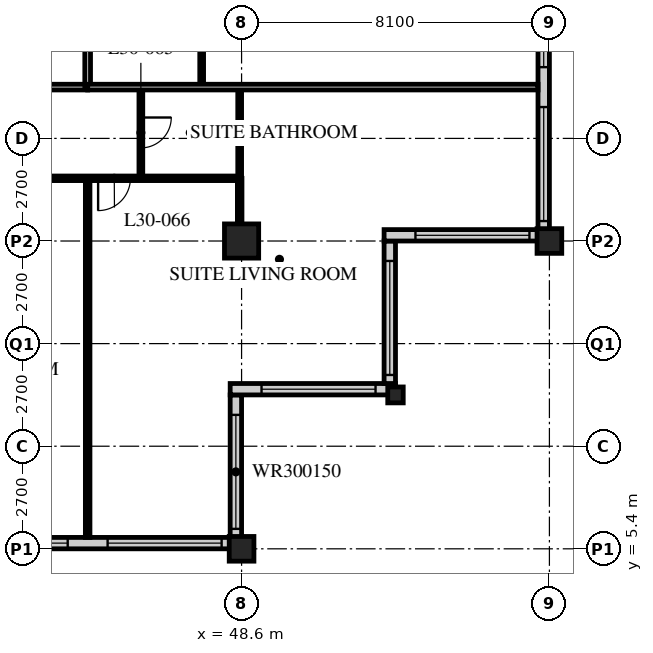
"""IFC4 building model, lengths in metres.
Left out: names, types, materials, properties, quantities, classifications, styles, units other than length and angle.
Written with IfcOpenShell. Run it as: python <this file> out.ifc"""

import sys

from ifc_helpers import new_model, si_unit, direction, frame, frame_2d, origin, origin_2d, place, context, subcontext, project, spatial, rectangle, hollow_rectangle, i_section, extrude, element, fill, save


model = new_model("IFC4")
c1 = context("Model", 3, precision=1e-05, world=origin(), true_north=direction((0.0, 1.0)))
c2 = subcontext(c1, "Body", "Model", "MODEL_VIEW")
j1 = project(units=[si_unit("LENGTHUNIT", "METRE"), si_unit("PLANEANGLEUNIT", "RADIAN")], contexts=[c1])
p1 = place(None, origin())
s1 = spatial("IfcSite", under=j1, at=p1, CompositionType="ELEMENT")
p2 = place(p1, origin())
s2 = spatial("IfcBuilding", under=s1, at=p2, CompositionType="ELEMENT")
p3 = place(p2, frame((0.0, 0.0, 120.4)))
s3 = spatial("IfcBuildingStorey", under=s2, at=p3, CompositionType="ELEMENT", Elevation=120.4)
p4 = place(p3, frame((48.6, 5.4, 0.0), z_axis=(0.0, 0.0, 1.0), x_axis=(1.0, 0.0, 0.0)))
e1 = element("IfcColumn", 1, at=p4, inside=s3, PredefinedType="COLUMN", context=c2, shape_type="SweptSolid", body=[
    extrude(hollow_rectangle(XDim=0.65, YDim=0.65, WallThickness=0.055, at=origin_2d()), origin(), (0.0, 0.0, 1.0), 3.4),
])
p5 = place(p3, frame((48.6, 13.5, 0.0), z_axis=(0.0, 0.0, 1.0), x_axis=(1.0, 0.0, 0.0)))
e2 = element("IfcColumn", 2, at=p5, inside=s3, PredefinedType="COLUMN", context=c2, shape_type="SweptSolid", body=[
    extrude(hollow_rectangle(XDim=0.9, YDim=0.9, WallThickness=0.09, at=origin_2d()), origin(), (0.0, 0.0, 1.0), 3.4),
])
p6 = place(p3, frame((52.65, 9.45, 0.0), z_axis=(0.0, 0.0, 1.0), x_axis=(1.0, 0.0, 0.0)))
e3 = element("IfcColumn", 3, at=p6, inside=s3, PredefinedType="COLUMN", context=c2, shape_type="SweptSolid", body=[
    extrude(i_section(OverallWidth=0.407, OverallDepth=0.419, WebThickness=0.031, FlangeThickness=0.049, FilletRadius=0.015, at=origin_2d()), origin(), (0.0, 0.0, 1.0), 3.4),
])
p7 = place(p3, frame((56.7, 13.5, 0.0), z_axis=(0.0, 0.0, 1.0), x_axis=(1.0, 0.0, 0.0)))
e4 = element("IfcColumn", 4, at=p7, inside=s3, PredefinedType="COLUMN", context=c2, shape_type="SweptSolid", body=[
    extrude(hollow_rectangle(XDim=0.65, YDim=0.65, WallThickness=0.055, at=origin_2d()), origin(), (0.0, 0.0, 1.0), 3.4),
])
p8 = place(p3, frame((8.4, 5.55, 0.0), z_axis=(0.0, 0.0, 1.0), x_axis=(1.0, 0.0, 0.0)))
e5 = element("IfcWall", 5, at=p8, inside=s3, PredefinedType="SOLIDWALL", context=c2, shape_type="SweptSolid", body=[
    extrude(rectangle(XDim=40.2, YDim=0.3, at=frame_2d((20.1, 0.0))), origin(), (0.0, 0.0, 1.0), 3.19),
])
p9 = place(p8, frame((0.225, 0.0, 0.9)))
e6 = element("IfcOpeningElement", 6, at=p9, cuts=e5, PredefinedType="OPENING", context=c2, shape_type="SweptSolid", body=[
    extrude(rectangle(XDim=3.0, YDim=2.0, at=frame_2d((1.5, 1.0))), frame((0.0, 0.16, 0.0), z_axis=(0.0, -1.0, 0.0), x_axis=(1.0, 0.0, 0.0)), (0.0, 0.0, 1.0), 0.32),
])
p10 = place(p8, frame((4.275, 0.0, 0.9)))
e7 = element("IfcOpeningElement", 7, at=p10, cuts=e5, PredefinedType="OPENING", context=c2, shape_type="SweptSolid", body=[
    extrude(rectangle(XDim=3.0, YDim=2.0, at=frame_2d((1.5, 1.0))), frame((0.0, 0.16, 0.0), z_axis=(0.0, -1.0, 0.0), x_axis=(1.0, 0.0, 0.0)), (0.0, 0.0, 1.0), 0.32),
])
p11 = place(p8, frame((8.325, 0.0, 0.9)))
e8 = element("IfcOpeningElement", 8, at=p11, cuts=e5, PredefinedType="OPENING", context=c2, shape_type="SweptSolid", body=[
    extrude(rectangle(XDim=3.0, YDim=2.0, at=frame_2d((1.5, 1.0))), frame((0.0, 0.16, 0.0), z_axis=(0.0, -1.0, 0.0), x_axis=(1.0, 0.0, 0.0)), (0.0, 0.0, 1.0), 0.32),
])
p12 = place(p8, frame((12.375, 0.0, 0.9)))
e9 = element("IfcOpeningElement", 9, at=p12, cuts=e5, PredefinedType="OPENING", context=c2, shape_type="SweptSolid", body=[
    extrude(rectangle(XDim=3.0, YDim=2.0, at=frame_2d((1.5, 1.0))), frame((0.0, 0.16, 0.0), z_axis=(0.0, -1.0, 0.0), x_axis=(1.0, 0.0, 0.0)), (0.0, 0.0, 1.0), 0.32),
])
p13 = place(p8, frame((16.425, 0.0, 0.9)))
e10 = element("IfcOpeningElement", 10, at=p13, cuts=e5, PredefinedType="OPENING", context=c2, shape_type="SweptSolid", body=[
    extrude(rectangle(XDim=3.0, YDim=2.0, at=frame_2d((1.5, 1.0))), frame((0.0, 0.16, 0.0), z_axis=(0.0, -1.0, 0.0), x_axis=(1.0, 0.0, 0.0)), (0.0, 0.0, 1.0), 0.32),
])
p14 = place(p8, frame((20.475, 0.0, 0.9)))
e11 = element("IfcOpeningElement", 11, at=p14, cuts=e5, PredefinedType="OPENING", context=c2, shape_type="SweptSolid", body=[
    extrude(rectangle(XDim=3.0, YDim=2.0, at=frame_2d((1.5, 1.0))), frame((0.0, 0.16, 0.0), z_axis=(0.0, -1.0, 0.0), x_axis=(1.0, 0.0, 0.0)), (0.0, 0.0, 1.0), 0.32),
])
p15 = place(p8, frame((24.525, 0.0, 0.9)))
e12 = element("IfcOpeningElement", 12, at=p15, cuts=e5, PredefinedType="OPENING", context=c2, shape_type="SweptSolid", body=[
    extrude(rectangle(XDim=3.0, YDim=2.0, at=frame_2d((1.5, 1.0))), frame((0.0, 0.16, 0.0), z_axis=(0.0, -1.0, 0.0), x_axis=(1.0, 0.0, 0.0)), (0.0, 0.0, 1.0), 0.32),
])
p16 = place(p8, frame((28.575, 0.0, 0.9)))
e13 = element("IfcOpeningElement", 13, at=p16, cuts=e5, PredefinedType="OPENING", context=c2, shape_type="SweptSolid", body=[
    extrude(rectangle(XDim=3.0, YDim=2.0, at=frame_2d((1.5, 1.0))), frame((0.0, 0.16, 0.0), z_axis=(0.0, -1.0, 0.0), x_axis=(1.0, 0.0, 0.0)), (0.0, 0.0, 1.0), 0.32),
])
p17 = place(p8, frame((32.625, 0.0, 0.9)))
e14 = element("IfcOpeningElement", 14, at=p17, cuts=e5, PredefinedType="OPENING", context=c2, shape_type="SweptSolid", body=[
    extrude(rectangle(XDim=3.0, YDim=2.0, at=frame_2d((1.5, 1.0))), frame((0.0, 0.16, 0.0), z_axis=(0.0, -1.0, 0.0), x_axis=(1.0, 0.0, 0.0)), (0.0, 0.0, 1.0), 0.32),
])
p18 = place(p8, frame((36.675, 0.0, 0.9)))
e15 = element("IfcOpeningElement", 15, at=p18, cuts=e5, PredefinedType="OPENING", context=c2, shape_type="SweptSolid", body=[
    extrude(rectangle(XDim=3.0, YDim=2.0, at=frame_2d((1.5, 1.0))), frame((0.0, 0.16, 0.0), z_axis=(0.0, -1.0, 0.0), x_axis=(1.0, 0.0, 0.0)), (0.0, 0.0, 1.0), 0.32),
])
p19 = place(p3, frame((48.45, 5.7, 0.0), z_axis=(0.0, 0.0, 1.0), x_axis=(0.0, 1.0, 0.0)))
e16 = element("IfcWall", 16, at=p19, inside=s3, PredefinedType="SOLIDWALL", context=c2, shape_type="SweptSolid", body=[
    extrude(rectangle(XDim=3.75, YDim=0.3, at=frame_2d((1.875, 0.0))), origin(), (0.0, 0.0, 1.0), 3.19),
])
p20 = place(p19, frame((0.225, 0.0, 0.9)))
e17 = element("IfcOpeningElement", 17, at=p20, cuts=e16, PredefinedType="OPENING", context=c2, shape_type="SweptSolid", body=[
    extrude(rectangle(XDim=3.0, YDim=1.5, at=frame_2d((1.5, 0.75))), frame((0.0, 0.16, 0.0), z_axis=(0.0, -1.0, 0.0), x_axis=(1.0, 0.0, 0.0)), (0.0, 0.0, 1.0), 0.32),
])
p21 = place(p3, frame((48.3, 9.6, 0.0), z_axis=(0.0, 0.0, 1.0), x_axis=(1.0, 0.0, 0.0)))
e18 = element("IfcWall", 18, at=p21, inside=s3, PredefinedType="SOLIDWALL", context=c2, shape_type="SweptSolid", body=[
    extrude(rectangle(XDim=4.35, YDim=0.3, at=frame_2d((2.175, 0.0))), origin(), (0.0, 0.0, 1.0), 3.19),
])
p22 = place(p21, frame((0.825, 0.0, 0.9)))
e19 = element("IfcOpeningElement", 19, at=p22, cuts=e18, PredefinedType="OPENING", context=c2, shape_type="SweptSolid", body=[
    extrude(rectangle(XDim=3.0, YDim=1.5, at=frame_2d((1.5, 0.75))), frame((0.0, 0.16, 0.0), z_axis=(0.0, -1.0, 0.0), x_axis=(1.0, 0.0, 0.0)), (0.0, 0.0, 1.0), 0.32),
])
p23 = place(p3, frame((52.5, 9.75, 0.0), z_axis=(0.0, 0.0, 1.0), x_axis=(0.0, 1.0, 0.0)))
e20 = element("IfcWall", 20, at=p23, inside=s3, PredefinedType="SOLIDWALL", context=c2, shape_type="SweptSolid", body=[
    extrude(rectangle(XDim=3.75, YDim=0.3, at=frame_2d((1.875, 0.0))), origin(), (0.0, 0.0, 1.0), 3.19),
])
p24 = place(p23, frame((0.225, 0.0, 0.9)))
e21 = element("IfcOpeningElement", 21, at=p24, cuts=e20, PredefinedType="OPENING", context=c2, shape_type="SweptSolid", body=[
    extrude(rectangle(XDim=3.0, YDim=1.5, at=frame_2d((1.5, 0.75))), frame((0.0, 0.16, 0.0), z_axis=(0.0, -1.0, 0.0), x_axis=(1.0, 0.0, 0.0)), (0.0, 0.0, 1.0), 0.32),
])
p25 = place(p3, frame((52.35, 13.65, 0.0), z_axis=(0.0, 0.0, 1.0), x_axis=(1.0, 0.0, 0.0)))
e22 = element("IfcWall", 22, at=p25, inside=s3, PredefinedType="SOLIDWALL", context=c2, shape_type="SweptSolid", body=[
    extrude(rectangle(XDim=4.35, YDim=0.3, at=frame_2d((2.175, 0.0))), origin(), (0.0, 0.0, 1.0), 3.19),
])
p26 = place(p25, frame((0.825, 0.0, 0.9)))
e23 = element("IfcOpeningElement", 23, at=p26, cuts=e22, PredefinedType="OPENING", context=c2, shape_type="SweptSolid", body=[
    extrude(rectangle(XDim=3.0, YDim=1.5, at=frame_2d((1.5, 0.75))), frame((0.0, 0.16, 0.0), z_axis=(0.0, -1.0, 0.0), x_axis=(1.0, 0.0, 0.0)), (0.0, 0.0, 1.0), 0.32),
])
p27 = place(p3, frame((56.55, 13.8, 0.0), z_axis=(0.0, 0.0, 1.0), x_axis=(0.0, 1.0, 0.0)))
e24 = element("IfcWall", 24, at=p27, inside=s3, PredefinedType="SOLIDWALL", context=c2, shape_type="SweptSolid", body=[
    extrude(rectangle(XDim=32.1, YDim=0.3, at=frame_2d((16.05, 0.0))), origin(), (0.0, 0.0, 1.0), 3.19),
])
p28 = place(p27, frame((0.225, 0.0, 0.9)))
e25 = element("IfcOpeningElement", 25, at=p28, cuts=e24, PredefinedType="OPENING", context=c2, shape_type="SweptSolid", body=[
    extrude(rectangle(XDim=3.0, YDim=2.0, at=frame_2d((1.5, 1.0))), frame((0.0, 0.16, 0.0), z_axis=(0.0, -1.0, 0.0), x_axis=(1.0, 0.0, 0.0)), (0.0, 0.0, 1.0), 0.32),
])
p29 = place(p27, frame((4.275, 0.0, 0.9)))
e26 = element("IfcOpeningElement", 26, at=p29, cuts=e24, PredefinedType="OPENING", context=c2, shape_type="SweptSolid", body=[
    extrude(rectangle(XDim=3.0, YDim=2.0, at=frame_2d((1.5, 1.0))), frame((0.0, 0.16, 0.0), z_axis=(0.0, -1.0, 0.0), x_axis=(1.0, 0.0, 0.0)), (0.0, 0.0, 1.0), 0.32),
])
p30 = place(p27, frame((8.325, 0.0, 0.9)))
e27 = element("IfcOpeningElement", 27, at=p30, cuts=e24, PredefinedType="OPENING", context=c2, shape_type="SweptSolid", body=[
    extrude(rectangle(XDim=3.0, YDim=2.0, at=frame_2d((1.5, 1.0))), frame((0.0, 0.16, 0.0), z_axis=(0.0, -1.0, 0.0), x_axis=(1.0, 0.0, 0.0)), (0.0, 0.0, 1.0), 0.32),
])
p31 = place(p27, frame((12.375, 0.0, 0.9)))
e28 = element("IfcOpeningElement", 28, at=p31, cuts=e24, PredefinedType="OPENING", context=c2, shape_type="SweptSolid", body=[
    extrude(rectangle(XDim=3.0, YDim=2.0, at=frame_2d((1.5, 1.0))), frame((0.0, 0.16, 0.0), z_axis=(0.0, -1.0, 0.0), x_axis=(1.0, 0.0, 0.0)), (0.0, 0.0, 1.0), 0.32),
])
p32 = place(p27, frame((16.425, 0.0, 0.9)))
e29 = element("IfcOpeningElement", 29, at=p32, cuts=e24, PredefinedType="OPENING", context=c2, shape_type="SweptSolid", body=[
    extrude(rectangle(XDim=3.0, YDim=2.0, at=frame_2d((1.5, 1.0))), frame((0.0, 0.16, 0.0), z_axis=(0.0, -1.0, 0.0), x_axis=(1.0, 0.0, 0.0)), (0.0, 0.0, 1.0), 0.32),
])
p33 = place(p27, frame((20.475, 0.0, 0.9)))
e30 = element("IfcOpeningElement", 30, at=p33, cuts=e24, PredefinedType="OPENING", context=c2, shape_type="SweptSolid", body=[
    extrude(rectangle(XDim=3.0, YDim=2.0, at=frame_2d((1.5, 1.0))), frame((0.0, 0.16, 0.0), z_axis=(0.0, -1.0, 0.0), x_axis=(1.0, 0.0, 0.0)), (0.0, 0.0, 1.0), 0.32),
])
p34 = place(p27, frame((24.525, 0.0, 0.9)))
e31 = element("IfcOpeningElement", 31, at=p34, cuts=e24, PredefinedType="OPENING", context=c2, shape_type="SweptSolid", body=[
    extrude(rectangle(XDim=3.0, YDim=2.0, at=frame_2d((1.5, 1.0))), frame((0.0, 0.16, 0.0), z_axis=(0.0, -1.0, 0.0), x_axis=(1.0, 0.0, 0.0)), (0.0, 0.0, 1.0), 0.32),
])
p35 = place(p27, frame((28.575, 0.0, 0.9)))
e32 = element("IfcOpeningElement", 32, at=p35, cuts=e24, PredefinedType="OPENING", context=c2, shape_type="SweptSolid", body=[
    extrude(rectangle(XDim=3.0, YDim=2.0, at=frame_2d((1.5, 1.0))), frame((0.0, 0.16, 0.0), z_axis=(0.0, -1.0, 0.0), x_axis=(1.0, 0.0, 0.0)), (0.0, 0.0, 1.0), 0.32),
])
p36 = place(p3, frame((12.15, 17.55, 0.0), z_axis=(0.0, 0.0, 1.0), x_axis=(1.0, 0.0, 0.0)))
e33 = element("IfcWall", 33, at=p36, inside=s3, PredefinedType="PARTITIONING", context=c2, shape_type="SweptSolid", body=[
    extrude(rectangle(XDim=32.4, YDim=0.15, at=frame_2d((16.2, 0.0))), origin(), (0.0, 0.0, 1.0), 3.19),
])
p37 = place(p36, frame((5.95, 0.0, 0.0)))
e34 = element("IfcOpeningElement", 34, at=p37, cuts=e33, PredefinedType="OPENING", context=c2, shape_type="SweptSolid", body=[
    extrude(rectangle(XDim=1.0, YDim=2.1, at=frame_2d((0.5, 1.05))), frame((0.0, 0.085, 0.0), z_axis=(0.0, -1.0, 0.0), x_axis=(1.0, 0.0, 0.0)), (0.0, 0.0, 1.0), 0.17),
])
p38 = place(p36, frame((17.725, 0.0, 0.0)))
e35 = element("IfcOpeningElement", 35, at=p38, cuts=e33, PredefinedType="OPENING", context=c2, shape_type="SweptSolid", body=[
    extrude(rectangle(XDim=1.0, YDim=2.1, at=frame_2d((0.5, 1.05))), frame((0.0, 0.085, 0.0), z_axis=(0.0, -1.0, 0.0), x_axis=(1.0, 0.0, 0.0)), (0.0, 0.0, 1.0), 0.17),
])
p39 = place(p36, frame((26.75, 0.0, 0.0)))
e36 = element("IfcOpeningElement", 36, at=p39, cuts=e33, PredefinedType="OPENING", context=c2, shape_type="SweptSolid", body=[
    extrude(rectangle(XDim=1.0, YDim=2.1, at=frame_2d((0.5, 1.05))), frame((0.0, 0.085, 0.0), z_axis=(0.0, -1.0, 0.0), x_axis=(1.0, 0.0, 0.0)), (0.0, 0.0, 1.0), 0.17),
])
p40 = place(p36, frame((1.525, 0.0, 0.0)))
e37 = element("IfcOpeningElement", 37, at=p40, cuts=e33, PredefinedType="OPENING", context=c2, shape_type="SweptSolid", body=[
    extrude(rectangle(XDim=1.0, YDim=2.1, at=frame_2d((0.5, 1.05))), frame((0.0, 0.085, 0.0), z_axis=(0.0, -1.0, 0.0), x_axis=(1.0, 0.0, 0.0)), (0.0, 0.0, 1.0), 0.17),
])
p41 = place(p36, frame((29.875, 0.0, 0.0)))
e38 = element("IfcOpeningElement", 38, at=p41, cuts=e33, PredefinedType="OPENING", context=c2, shape_type="SweptSolid", body=[
    extrude(rectangle(XDim=1.0, YDim=2.1, at=frame_2d((0.5, 1.05))), frame((0.0, 0.085, 0.0), z_axis=(0.0, -1.0, 0.0), x_axis=(1.0, 0.0, 0.0)), (0.0, 0.0, 1.0), 0.17),
])
p42 = place(p3, frame((44.55, 17.55, 0.0), z_axis=(0.0, 0.0, 1.0), x_axis=(0.0, 1.0, 0.0)))
e39 = element("IfcWall", 39, at=p42, inside=s3, PredefinedType="PARTITIONING", context=c2, shape_type="SweptSolid", body=[
    extrude(rectangle(XDim=28.35, YDim=0.15, at=frame_2d((14.175, 0.0))), origin(), (0.0, 0.0, 1.0), 3.19),
])
p43 = place(p42, frame((2.75, 0.0, 0.0)))
e40 = element("IfcOpeningElement", 40, at=p43, cuts=e39, PredefinedType="OPENING", context=c2, shape_type="SweptSolid", body=[
    extrude(rectangle(XDim=1.0, YDim=2.1, at=frame_2d((0.5, 1.05))), frame((0.0, 0.085, 0.0), z_axis=(0.0, -1.0, 0.0), x_axis=(1.0, 0.0, 0.0)), (0.0, 0.0, 1.0), 0.17),
])
p44 = place(p42, frame((6.5, 0.0, 0.0)))
e41 = element("IfcOpeningElement", 41, at=p44, cuts=e39, PredefinedType="OPENING", context=c2, shape_type="SweptSolid", body=[
    extrude(rectangle(XDim=1.0, YDim=2.1, at=frame_2d((0.5, 1.05))), frame((0.0, 0.085, 0.0), z_axis=(0.0, -1.0, 0.0), x_axis=(1.0, 0.0, 0.0)), (0.0, 0.0, 1.0), 0.17),
])
p45 = place(p42, frame((10.0, 0.0, 0.0)))
e42 = element("IfcOpeningElement", 42, at=p45, cuts=e39, PredefinedType="OPENING", context=c2, shape_type="SweptSolid", body=[
    extrude(rectangle(XDim=1.0, YDim=2.1, at=frame_2d((0.5, 1.05))), frame((0.0, 0.085, 0.0), z_axis=(0.0, -1.0, 0.0), x_axis=(1.0, 0.0, 0.0)), (0.0, 0.0, 1.0), 0.17),
])
p46 = place(p42, frame((21.65, 0.0, 0.0)))
e43 = element("IfcOpeningElement", 43, at=p46, cuts=e39, PredefinedType="OPENING", context=c2, shape_type="SweptSolid", body=[
    extrude(rectangle(XDim=1.0, YDim=2.1, at=frame_2d((0.5, 1.05))), frame((0.0, 0.085, 0.0), z_axis=(0.0, -1.0, 0.0), x_axis=(1.0, 0.0, 0.0)), (0.0, 0.0, 1.0), 0.17),
])
p47 = place(p42, frame((26.75, 0.0, 0.0)))
e44 = element("IfcOpeningElement", 44, at=p47, cuts=e39, PredefinedType="OPENING", context=c2, shape_type="SweptSolid", body=[
    extrude(rectangle(XDim=1.0, YDim=2.1, at=frame_2d((0.5, 1.05))), frame((0.0, 0.085, 0.0), z_axis=(0.0, -1.0, 0.0), x_axis=(1.0, 0.0, 0.0)), (0.0, 0.0, 1.0), 0.17),
])
p48 = place(p3, frame((47.55, 17.55, 0.0), z_axis=(0.0, 0.0, 1.0), x_axis=(0.0, 1.0, 0.0)))
e45 = element("IfcWall", 45, at=p48, inside=s3, PredefinedType="PARTITIONING", context=c2, shape_type="SweptSolid", body=[
    extrude(rectangle(XDim=2.6, YDim=0.1, at=frame_2d((1.3, 0.0))), origin(), (0.0, 0.0, 1.0), 3.19),
])
p49 = place(p3, frame((40.5, 15.15, 0.0), z_axis=(0.0, 0.0, 1.0), x_axis=(1.0, 0.0, 0.0)))
e46 = element("IfcWall", 46, at=p49, inside=s3, PredefinedType="PARTITIONING", context=c2, shape_type="SweptSolid", body=[
    extrude(rectangle(XDim=8.05, YDim=0.12, at=frame_2d((4.025, 0.0))), origin(), (0.0, 0.0, 1.0), 3.19),
])
p50 = place(p49, frame((0.475, 0.0, 0.0)))
e47 = element("IfcOpeningElement", 47, at=p50, cuts=e46, PredefinedType="OPENING", context=c2, shape_type="SweptSolid", body=[
    extrude(rectangle(XDim=0.85, YDim=2.1, at=frame_2d((0.425, 1.05))), frame((0.0, 0.07, 0.0), z_axis=(0.0, -1.0, 0.0), x_axis=(1.0, 0.0, 0.0)), (0.0, 0.0, 1.0), 0.14),
])
p51 = place(p49, frame((4.325, 0.0, 0.0)))
e48 = element("IfcOpeningElement", 48, at=p51, cuts=e46, PredefinedType="OPENING", context=c2, shape_type="SweptSolid", body=[
    extrude(rectangle(XDim=0.85, YDim=2.1, at=frame_2d((0.425, 1.05))), frame((0.0, 0.07, 0.0), z_axis=(0.0, -1.0, 0.0), x_axis=(1.0, 0.0, 0.0)), (0.0, 0.0, 1.0), 0.14),
])
p52 = place(p3, frame((45.95, 17.55, 0.0), z_axis=(0.0, 0.0, 1.0), x_axis=(0.0, -1.0, 0.0)))
e49 = element("IfcWall", 49, at=p52, inside=s3, PredefinedType="PARTITIONING", context=c2, shape_type="SweptSolid", body=[
    extrude(rectangle(XDim=2.4, YDim=0.1, at=frame_2d((1.2, 0.0))), origin(), (0.0, 0.0, 1.0), 3.19),
])
p53 = place(p52, frame((0.8, 0.0, 0.0)))
e50 = element("IfcOpeningElement", 50, at=p53, cuts=e49, PredefinedType="OPENING", context=c2, shape_type="SweptSolid", body=[
    extrude(rectangle(XDim=0.8, YDim=2.1, at=frame_2d((0.4, 1.05))), frame((0.0, 0.06, 0.0), z_axis=(0.0, -1.0, 0.0), x_axis=(1.0, 0.0, 0.0)), (0.0, 0.0, 1.0), 0.12),
])
p54 = place(p3, frame((48.55, 17.55, 0.0), z_axis=(0.0, 0.0, 1.0), x_axis=(0.0, -1.0, 0.0)))
e51 = element("IfcWall", 51, at=p54, inside=s3, PredefinedType="PARTITIONING", context=c2, shape_type="SweptSolid", body=[
    extrude(rectangle(XDim=2.4, YDim=0.1, at=frame_2d((1.2, 0.0))), origin(), (0.0, 0.0, 1.0), 2.578),
])
p55 = place(p3, frame((44.55, 15.15, 0.0), z_axis=(0.0, 0.0, 1.0), x_axis=(0.0, -1.0, 0.0)))
e52 = element("IfcWall", 52, at=p55, inside=s3, PredefinedType="PARTITIONING", context=c2, shape_type="SweptSolid", body=[
    extrude(rectangle(XDim=9.45, YDim=0.12, at=frame_2d((4.725, 0.0))), origin(), (0.0, 0.0, 1.0), 3.19),
])
p56 = place(p3, frame((44.55, 17.55, 0.0), z_axis=(0.0, 0.0, 1.0), x_axis=(1.0, 0.0, 0.0)))
e53 = element("IfcWall", 53, at=p56, inside=s3, PredefinedType="PARTITIONING", context=c2, shape_type="SweptSolid", body=[
    extrude(rectangle(XDim=11.85, YDim=0.15, at=frame_2d((5.925, 0.0))), origin(), (0.0, 0.0, 1.0), 3.19),
])
p57 = place(p3, frame((48.55, 15.15, 0.0), z_axis=(0.0, 0.0, 1.0), x_axis=(0.0, -1.0, 0.0)))
e54 = element("IfcWall", 54, at=p57, inside=s3, PredefinedType="PARTITIONING", context=c2, shape_type="SweptSolid", body=[
    extrude(rectangle(XDim=1.2, YDim=0.12, at=frame_2d((0.6, 0.0))), origin(), (0.0, 0.0, 1.0), 2.578),
])
p58 = place(p17, origin())
e55 = element("IfcWindow", 55, at=p58, inside=s3, PartitioningType="SINGLE_PANEL", PredefinedType="WINDOW", context=c2, shape_type="SweptSolid", body=[
    extrude(rectangle(XDim=3.0, YDim=2.0, at=frame_2d((1.5, 1.0))), frame((0.0, 0.03, 0.0), z_axis=(0.0, -1.0, 0.0), x_axis=(1.0, 0.0, 0.0)), (0.0, 0.0, 1.0), 0.06),
])
fill(e14, e55)
p59 = place(p18, origin())
e56 = element("IfcWindow", 56, at=p59, inside=s3, PartitioningType="SINGLE_PANEL", PredefinedType="WINDOW", context=c2, shape_type="SweptSolid", body=[
    extrude(rectangle(XDim=3.0, YDim=2.0, at=frame_2d((1.5, 1.0))), frame((0.0, 0.03, 0.0), z_axis=(0.0, -1.0, 0.0), x_axis=(1.0, 0.0, 0.0)), (0.0, 0.0, 1.0), 0.06),
])
fill(e15, e56)
p60 = place(p20, origin())
e57 = element("IfcWindow", 57, at=p60, inside=s3, PartitioningType="SINGLE_PANEL", PredefinedType="WINDOW", context=c2, shape_type="SweptSolid", body=[
    extrude(rectangle(XDim=3.0, YDim=1.5, at=frame_2d((1.5, 0.75))), frame((0.0, 0.03, 0.0), z_axis=(0.0, -1.0, 0.0), x_axis=(1.0, 0.0, 0.0)), (0.0, 0.0, 1.0), 0.06),
])
fill(e17, e57)
p61 = place(p22, origin())
e58 = element("IfcWindow", 58, at=p61, inside=s3, PartitioningType="SINGLE_PANEL", PredefinedType="WINDOW", context=c2, shape_type="SweptSolid", body=[
    extrude(rectangle(XDim=3.0, YDim=1.5, at=frame_2d((1.5, 0.75))), frame((0.0, 0.03, 0.0), z_axis=(0.0, -1.0, 0.0), x_axis=(1.0, 0.0, 0.0)), (0.0, 0.0, 1.0), 0.06),
])
fill(e19, e58)
p62 = place(p24, origin())
e59 = element("IfcWindow", 59, at=p62, inside=s3, PartitioningType="SINGLE_PANEL", PredefinedType="WINDOW", context=c2, shape_type="SweptSolid", body=[
    extrude(rectangle(XDim=3.0, YDim=1.5, at=frame_2d((1.5, 0.75))), frame((0.0, 0.03, 0.0), z_axis=(0.0, -1.0, 0.0), x_axis=(1.0, 0.0, 0.0)), (0.0, 0.0, 1.0), 0.06),
])
fill(e21, e59)
p63 = place(p26, origin())
e60 = element("IfcWindow", 60, at=p63, inside=s3, PartitioningType="SINGLE_PANEL", PredefinedType="WINDOW", context=c2, shape_type="SweptSolid", body=[
    extrude(rectangle(XDim=3.0, YDim=1.5, at=frame_2d((1.5, 0.75))), frame((0.0, 0.03, 0.0), z_axis=(0.0, -1.0, 0.0), x_axis=(1.0, 0.0, 0.0)), (0.0, 0.0, 1.0), 0.06),
])
fill(e23, e60)
p64 = place(p28, origin())
e61 = element("IfcWindow", 61, at=p64, inside=s3, PartitioningType="SINGLE_PANEL", PredefinedType="WINDOW", context=c2, shape_type="SweptSolid", body=[
    extrude(rectangle(XDim=3.0, YDim=2.0, at=frame_2d((1.5, 1.0))), frame((0.0, 0.03, 0.0), z_axis=(0.0, -1.0, 0.0), x_axis=(1.0, 0.0, 0.0)), (0.0, 0.0, 1.0), 0.06),
])
fill(e25, e61)
p65 = place(p29, origin())
e62 = element("IfcWindow", 62, at=p65, inside=s3, PartitioningType="SINGLE_PANEL", PredefinedType="WINDOW", context=c2, shape_type="SweptSolid", body=[
    extrude(rectangle(XDim=3.0, YDim=2.0, at=frame_2d((1.5, 1.0))), frame((0.0, 0.03, 0.0), z_axis=(0.0, -1.0, 0.0), x_axis=(1.0, 0.0, 0.0)), (0.0, 0.0, 1.0), 0.06),
])
fill(e26, e62)
p66 = place(p53, origin())
e63 = element("IfcDoor", 63, at=p66, inside=s3, OperationType="SINGLE_SWING_LEFT", PredefinedType="DOOR", context=c2, shape_type="SweptSolid", body=[
    extrude(rectangle(XDim=0.8, YDim=2.1, at=frame_2d((0.4, 1.05))), frame((0.0, 0.025, 0.0), z_axis=(0.0, -1.0, 0.0), x_axis=(1.0, 0.0, 0.0)), (0.0, 0.0, 1.0), 0.05),
])
fill(e50, e63)
p67 = place(p51, origin())
e64 = element("IfcDoor", 64, at=p67, inside=s3, OperationType="SINGLE_SWING_RIGHT", PredefinedType="DOOR", context=c2, shape_type="SweptSolid", body=[
    extrude(rectangle(XDim=0.85, YDim=2.1, at=frame_2d((0.425, 1.05))), frame((0.0, 0.025, 0.0), z_axis=(0.0, -1.0, 0.0), x_axis=(1.0, 0.0, 0.0)), (0.0, 0.0, 1.0), 0.05),
])
fill(e48, e64)
save(model, sys.argv[1])
